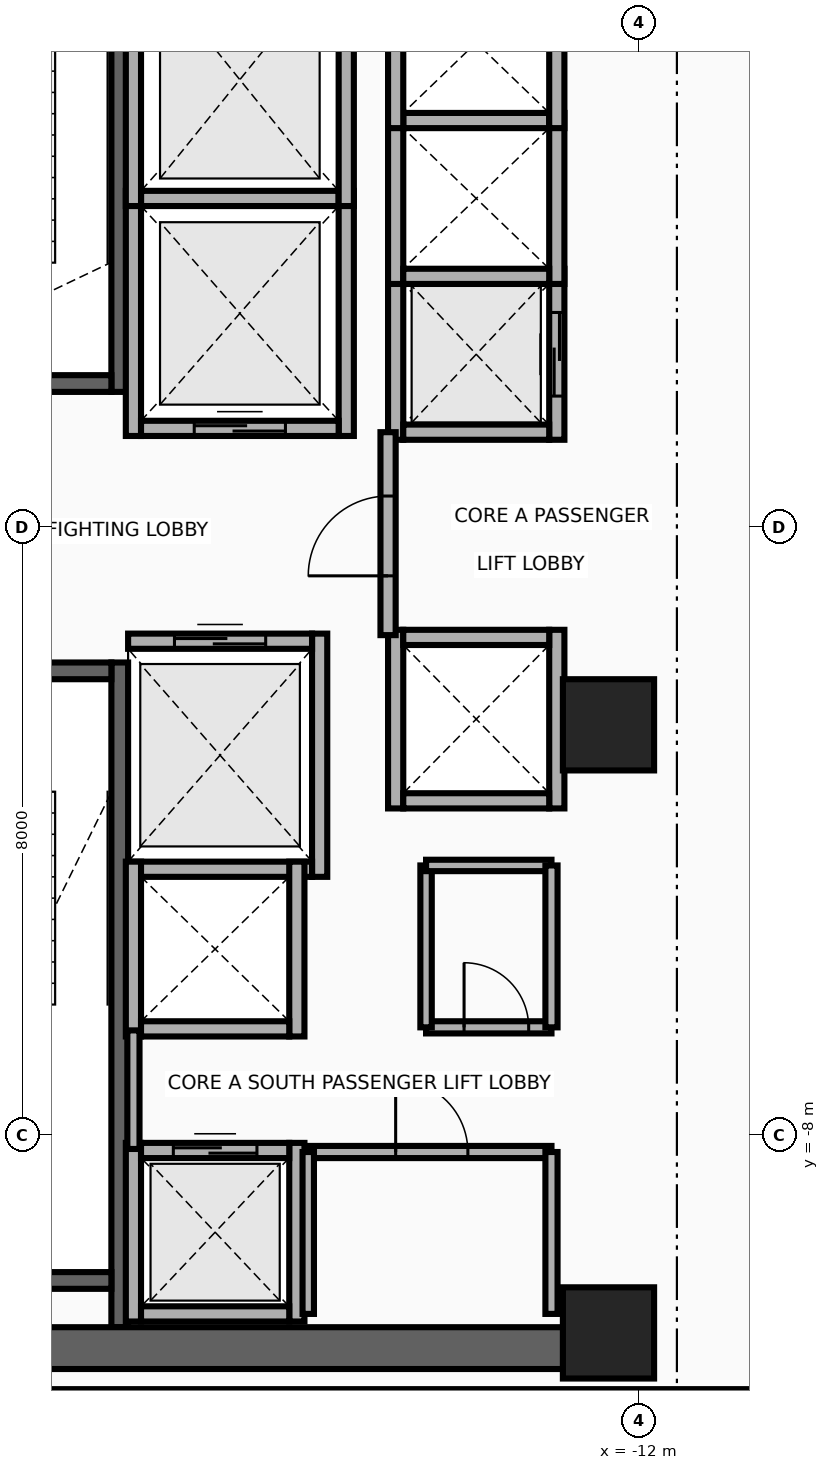
"""IFC4 building model, lengths in metres.
Left out: names, types, materials, properties, quantities, classifications, styles, units other than length and angle.
Written with IfcOpenShell. Run it as: python <this file> out.ifc"""

import sys

from ifc_helpers import new_model, si_unit, direction, frame, frame_2d, origin, origin_2d, place, context, subcontext, project, spatial, rectangle, extrude, source, transform, mapped, element, fill, save


model = new_model("IFC4")
c1 = context("Model", 3, precision=1e-05, world=origin(), true_north=direction((0.0, 1.0)))
c2 = subcontext(c1, "Body", "Model", "MODEL_VIEW")
j1 = project(units=[si_unit("LENGTHUNIT", "METRE"), si_unit("PLANEANGLEUNIT", "RADIAN")], contexts=[c1])
p1 = place(None, origin())
s1 = spatial("IfcSite", under=j1, at=p1, CompositionType="ELEMENT")
p2 = place(p1, origin())
s2 = spatial("IfcBuilding", under=s1, at=p2, CompositionType="ELEMENT")
p3 = place(p2, frame((0.0, 0.0, 164.9)))
s3 = spatial("IfcBuildingStorey", under=s2, at=p3, CompositionType="ELEMENT", Elevation=164.9)
p4 = place(p3, frame((-18.83, 1.78, 0.0), z_axis=(0.0, 0.0, 1.0), x_axis=(0.0, 1.0, 0.0)))
e1 = element("IfcWall", 1, at=p4, inside=s3, PredefinedType="SHEAR", context=c2, shape_type="SweptSolid", body=[
    extrude(rectangle(XDim=8.745, YDim=0.22, at=frame_2d((4.373, 0.0))), origin(), (0.0, 0.0, 1.0), 3.46),
])
p5 = place(p3, frame((-22.05, 1.89, 0.0), z_axis=(0.0, 0.0, 1.0), x_axis=(1.0, 0.0, 0.0)))
e2 = element("IfcWall", 2, at=p5, inside=s3, PredefinedType="SHEAR", context=c2, shape_type="SweptSolid", body=[
    extrude(rectangle(XDim=3.11, YDim=0.22, at=frame_2d((1.555, 0.0))), origin(), (0.0, 0.0, 1.0), 3.46),
])
p6 = place(p5, frame((1.0, 0.0, 0.0)))
e3 = element("IfcOpeningElement", 3, at=p6, cuts=e2, PredefinedType="OPENING", context=c2, shape_type="SweptSolid", body=[
    extrude(rectangle(XDim=1.1, YDim=2.15, at=frame_2d((0.55, 1.075))), frame((0.0, 0.125, 0.0), z_axis=(0.0, -1.0, 0.0), x_axis=(1.0, 0.0, 0.0)), (0.0, 0.0, 1.0), 0.25),
])
p7 = place(p3, frame((-18.83, -10.525, 0.0), z_axis=(0.0, 0.0, 1.0), x_axis=(0.0, 1.0, 0.0)))
e4 = element("IfcWall", 4, at=p7, inside=s3, PredefinedType="SHEAR", context=c2, shape_type="SweptSolid", body=[
    extrude(rectangle(XDim=8.745, YDim=0.22, at=frame_2d((4.373, 0.0))), origin(), (0.0, 0.0, 1.0), 3.46),
])
p8 = place(p3, frame((-22.05, -9.91, 0.0), z_axis=(0.0, 0.0, 1.0), x_axis=(1.0, 0.0, 0.0)))
e5 = element("IfcWall", 5, at=p8, inside=s3, PredefinedType="SHEAR", context=c2, shape_type="SweptSolid", body=[
    extrude(rectangle(XDim=3.11, YDim=0.22, at=frame_2d((1.555, 0.0))), origin(), (0.0, 0.0, 1.0), 3.46),
])
p9 = place(p3, frame((-22.05, -1.89, 0.0), z_axis=(0.0, 0.0, 1.0), x_axis=(1.0, 0.0, 0.0)))
e6 = element("IfcWall", 6, at=p9, inside=s3, PredefinedType="SHEAR", context=c2, shape_type="SweptSolid", body=[
    extrude(rectangle(XDim=3.11, YDim=0.22, at=frame_2d((1.555, 0.0))), origin(), (0.0, 0.0, 1.0), 3.46),
])
p10 = place(p9, frame((1.0, 0.0, 0.0)))
e7 = element("IfcOpeningElement", 7, at=p10, cuts=e6, PredefinedType="OPENING", context=c2, shape_type="SweptSolid", body=[
    extrude(rectangle(XDim=1.1, YDim=2.15, at=frame_2d((0.55, 1.075))), frame((0.0, 0.125, 0.0), z_axis=(0.0, -1.0, 0.0), x_axis=(1.0, 0.0, 0.0)), (0.0, 0.0, 1.0), 0.25),
])
p11 = place(p3, frame((-22.65, -10.8, 0.0), z_axis=(0.0, 0.0, 1.0), x_axis=(1.0, 0.0, 0.0)))
e8 = element("IfcWall", 8, at=p11, inside=s3, PredefinedType="SHEAR", context=c2, shape_type="SweptSolid", body=[
    extrude(rectangle(XDim=10.25, YDim=0.55, at=frame_2d((5.125, 0.0))), origin(), (0.0, 0.0, 1.0), 3.46),
])
m1 = source(origin(), c2, "Body", "SweptSolid", [
    extrude(rectangle(XDim=1.2, YDim=1.2, at=origin_2d()), origin(), (0.0, 0.0, 1.0), 3.7),
])
for number, where, z_axis, x_axis in (
    (9, (-12.4, -10.6, 0.0), (0.0, 0.0, 1.0), (1.0, 0.0, 0.0)),
    (10, (-12.4, -2.6, 0.0), (0.0, 0.0, 1.0), (1.0, 0.0, 0.0)),
):
    element("IfcColumn", number, at=place(p3, frame(where, z_axis=z_axis, x_axis=x_axis)), inside=s3, PredefinedType="COLUMN", context=c2, shape_type="MappedRepresentation", body=[
        mapped(m1, transform((0.0, 0.0, 0.0), x_axis=(1.0, 0.0, 0.0), y_axis=(0.0, 1.0, 0.0), z_axis=(0.0, 0.0, 1.0), scale=1.0)),
    ])
for number, where, z_axis, x_axis in (
    (11, (-18.65, 1.2, 0.0), (0.0, 0.0, 1.0), (0.0, 1.0, 0.0)),
    (12, (-15.85, 1.2, 0.0), (0.0, 0.0, 1.0), (0.0, 1.0, 0.0)),
):
    element("IfcWall", number, at=place(p3, frame(where, z_axis=z_axis, x_axis=x_axis)), inside=s3, PredefinedType="MOVABLE", context=c2, shape_type="SweptSolid", body=[
        extrude(rectangle(XDim=3.225, YDim=0.2, at=frame_2d((1.613, 0.0))), origin(), (0.0, 0.0, 1.0), 3.46),
    ])
p12 = place(p3, frame((-18.55, 1.3, 0.0), z_axis=(0.0, 0.0, 1.0), x_axis=(1.0, 0.0, 0.0)))
e13 = element("IfcWall", 13, at=p12, inside=s3, PredefinedType="MOVABLE", context=c2, shape_type="SweptSolid", body=[
    extrude(rectangle(XDim=2.6, YDim=0.2, at=frame_2d((1.3, 0.0))), origin(), (0.0, 0.0, 1.0), 3.46),
])
p13 = place(p12, frame((0.7, 0.0, 0.0)))
e14 = element("IfcOpeningElement", 14, at=p13, cuts=e13, PredefinedType="OPENING", context=c2, shape_type="SweptSolid", body=[
    extrude(rectangle(XDim=1.2, YDim=2.1, at=frame_2d((0.6, 1.05))), frame((0.0, 0.115, 0.0), z_axis=(0.0, -1.0, 0.0), x_axis=(1.0, 0.0, 0.0)), (0.0, 0.0, 1.0), 0.23),
])
p14 = place(p3, frame((-18.55, 4.325, 0.0), z_axis=(0.0, 0.0, 1.0), x_axis=(1.0, 0.0, 0.0)))
e15 = element("IfcWall", 15, at=p14, inside=s3, PredefinedType="MOVABLE", context=c2, shape_type="SweptSolid", body=[
    extrude(rectangle(XDim=2.6, YDim=0.2, at=frame_2d((1.3, 0.0))), origin(), (0.0, 0.0, 1.0), 3.46),
])
p15 = place(p3, frame((-16.2, -4.6, 0.0), z_axis=(0.0, 0.0, 1.0), x_axis=(0.0, 1.0, 0.0)))
e16 = element("IfcWall", 16, at=p15, inside=s3, PredefinedType="MOVABLE", context=c2, shape_type="SweptSolid", body=[
    extrude(rectangle(XDim=3.2, YDim=0.2, at=frame_2d((1.6, 0.0))), origin(), (0.0, 0.0, 1.0), 3.46),
])
p16 = place(p3, frame((-18.72, -4.5, 0.0), z_axis=(0.0, 0.0, 1.0), x_axis=(1.0, 0.0, 0.0)))
e17 = element("IfcWall", 17, at=p16, inside=s3, PredefinedType="MOVABLE", context=c2, shape_type="SweptSolid", body=[
    extrude(rectangle(XDim=2.42, YDim=0.2, at=frame_2d((1.21, 0.0))), origin(), (0.0, 0.0, 1.0), 3.46),
])
p17 = place(p3, frame((-18.72, -1.5, 0.0), z_axis=(0.0, 0.0, 1.0), x_axis=(1.0, 0.0, 0.0)))
e18 = element("IfcWall", 18, at=p17, inside=s3, PredefinedType="MOVABLE", context=c2, shape_type="SweptSolid", body=[
    extrude(rectangle(XDim=2.42, YDim=0.2, at=frame_2d((1.21, 0.0))), origin(), (0.0, 0.0, 1.0), 3.46),
])
p18 = place(p17, frame((0.61, 0.0, 0.0)))
e19 = element("IfcOpeningElement", 19, at=p18, cuts=e18, PredefinedType="OPENING", context=c2, shape_type="SweptSolid", body=[
    extrude(rectangle(XDim=1.2, YDim=2.1, at=frame_2d((0.6, 1.05))), frame((0.0, 0.115, 0.0), z_axis=(0.0, -1.0, 0.0), x_axis=(1.0, 0.0, 0.0)), (0.0, 0.0, 1.0), 0.23),
])
for number, where, z_axis, x_axis in (
    (20, (-18.65, 4.225, 0.0), (0.0, 0.0, 1.0), (0.0, 1.0, 0.0)),
    (21, (-15.85, 4.225, 0.0), (0.0, 0.0, 1.0), (0.0, 1.0, 0.0)),
):
    element("IfcWall", number, at=place(p3, frame(where, z_axis=z_axis, x_axis=x_axis)), inside=s3, PredefinedType="MOVABLE", context=c2, shape_type="SweptSolid", body=[
        extrude(rectangle(XDim=3.325, YDim=0.2, at=frame_2d((1.663, 0.0))), origin(), (0.0, 0.0, 1.0), 3.46),
    ])
for number, where, z_axis, x_axis in (
    (22, (-18.65, -10.45, 0.0), (0.0, 0.0, 1.0), (0.0, 1.0, 0.0)),
    (23, (-16.5, -10.45, 0.0), (0.0, 0.0, 1.0), (0.0, 1.0, 0.0)),
):
    element("IfcWall", number, at=place(p3, frame(where, z_axis=z_axis, x_axis=x_axis)), inside=s3, PredefinedType="MOVABLE", context=c2, shape_type="SweptSolid", body=[
        extrude(rectangle(XDim=2.35, YDim=0.2, at=frame_2d((1.175, 0.0))), origin(), (0.0, 0.0, 1.0), 2.666),
    ])
p19 = place(p3, frame((-18.55, -10.35, 0.0), z_axis=(0.0, 0.0, 1.0), x_axis=(1.0, 0.0, 0.0)))
e24 = element("IfcWall", 24, at=p19, inside=s3, PredefinedType="MOVABLE", context=c2, shape_type="SweptSolid", body=[
    extrude(rectangle(XDim=1.95, YDim=0.2, at=frame_2d((0.975, 0.0))), origin(), (0.0, 0.0, 1.0), 2.666),
])
p20 = place(p3, frame((-18.55, -8.2, 0.0), z_axis=(0.0, 0.0, 1.0), x_axis=(1.0, 0.0, 0.0)))
e25 = element("IfcWall", 25, at=p20, inside=s3, PredefinedType="MOVABLE", context=c2, shape_type="SweptSolid", body=[
    extrude(rectangle(XDim=1.95, YDim=0.2, at=frame_2d((0.975, 0.0))), origin(), (0.0, 0.0, 1.0), 3.46),
])
p21 = place(p20, frame((0.425, 0.0, 0.0)))
e26 = element("IfcOpeningElement", 26, at=p21, cuts=e25, PredefinedType="OPENING", context=c2, shape_type="SweptSolid", body=[
    extrude(rectangle(XDim=1.1, YDim=2.1, at=frame_2d((0.55, 1.05))), frame((0.0, 0.115, 0.0), z_axis=(0.0, -1.0, 0.0), x_axis=(1.0, 0.0, 0.0)), (0.0, 0.0, 1.0), 0.23),
])
p22 = place(p3, frame((-15.2, 1.15, 0.0), z_axis=(0.0, 0.0, 1.0), x_axis=(0.0, 1.0, 0.0)))
e27 = element("IfcWall", 27, at=p22, inside=s3, PredefinedType="MOVABLE", context=c2, shape_type="SweptSolid", body=[
    extrude(rectangle(XDim=2.25, YDim=0.2, at=frame_2d((1.125, 0.0))), origin(), (0.0, 0.0, 1.0), 3.46),
])
p23 = place(p3, frame((-13.08, 1.15, 0.0), z_axis=(0.0, 0.0, 1.0), x_axis=(0.0, 1.0, 0.0)))
e28 = element("IfcWall", 28, at=p23, inside=s3, PredefinedType="MOVABLE", context=c2, shape_type="SweptSolid", body=[
    extrude(rectangle(XDim=2.25, YDim=0.2, at=frame_2d((1.125, 0.0))), origin(), (0.0, 0.0, 1.0), 3.46),
])
p24 = place(p23, frame((0.575, 0.0, 0.0)))
e29 = element("IfcOpeningElement", 29, at=p24, cuts=e28, PredefinedType="OPENING", context=c2, shape_type="SweptSolid", body=[
    extrude(rectangle(XDim=1.1, YDim=2.1, at=frame_2d((0.55, 1.05))), frame((0.0, 0.115, 0.0), z_axis=(0.0, -1.0, 0.0), x_axis=(1.0, 0.0, 0.0)), (0.0, 0.0, 1.0), 0.23),
])
p25 = place(p3, frame((-15.1, 1.25, 0.0), z_axis=(0.0, 0.0, 1.0), x_axis=(1.0, 0.0, 0.0)))
e30 = element("IfcWall", 30, at=p25, inside=s3, PredefinedType="MOVABLE", context=c2, shape_type="SweptSolid", body=[
    extrude(rectangle(XDim=1.92, YDim=0.2, at=frame_2d((0.96, 0.0))), origin(), (0.0, 0.0, 1.0), 3.46),
])
for number, where, z_axis, x_axis in (
    (31, (-15.2, 3.2, 0.0), (0.0, 0.0, 1.0), (0.0, 1.0, 0.0)),
    (32, (-13.08, 3.2, 0.0), (0.0, 0.0, 1.0), (0.0, 1.0, 0.0)),
):
    element("IfcWall", number, at=place(p3, frame(where, z_axis=z_axis, x_axis=x_axis)), inside=s3, PredefinedType="MOVABLE", context=c2, shape_type="SweptSolid", body=[
        extrude(rectangle(XDim=2.25, YDim=0.2, at=frame_2d((1.125, 0.0))), origin(), (0.0, 0.0, 1.0), 3.46),
    ])
for number, where, z_axis, x_axis in (
    (33, (-15.1, 3.3, 0.0), (0.0, 0.0, 1.0), (1.0, 0.0, 0.0)),
    (34, (-15.1, 5.35, 0.0), (0.0, 0.0, 1.0), (1.0, 0.0, 0.0)),
):
    element("IfcWall", number, at=place(p3, frame(where, z_axis=z_axis, x_axis=x_axis)), inside=s3, PredefinedType="MOVABLE", context=c2, shape_type="SweptSolid", body=[
        extrude(rectangle(XDim=1.92, YDim=0.2, at=frame_2d((0.96, 0.0))), origin(), (0.0, 0.0, 1.0), 3.46),
    ])
for number, where, z_axis, x_axis in (
    (35, (-15.2, 5.25, 0.0), (0.0, 0.0, 1.0), (0.0, 1.0, 0.0)),
    (36, (-13.08, 5.25, 0.0), (0.0, 0.0, 1.0), (0.0, 1.0, 0.0)),
):
    element("IfcWall", number, at=place(p3, frame(where, z_axis=z_axis, x_axis=x_axis)), inside=s3, PredefinedType="MOVABLE", context=c2, shape_type="SweptSolid", body=[
        extrude(rectangle(XDim=2.25, YDim=0.2, at=frame_2d((1.125, 0.0))), origin(), (0.0, 0.0, 1.0), 3.46),
    ])
for number, where, z_axis, x_axis in (
    (37, (-18.65, -6.7, 0.0), (0.0, 0.0, 1.0), (0.0, 1.0, 0.0)),
    (38, (-16.5, -6.7, 0.0), (0.0, 0.0, 1.0), (0.0, 1.0, 0.0)),
):
    element("IfcWall", number, at=place(p3, frame(where, z_axis=z_axis, x_axis=x_axis)), inside=s3, PredefinedType="MOVABLE", context=c2, shape_type="SweptSolid", body=[
        extrude(rectangle(XDim=2.3, YDim=0.2, at=frame_2d((1.15, 0.0))), origin(), (0.0, 0.0, 1.0), 3.46),
    ])
p26 = place(p3, frame((-18.55, -6.6, 0.0), z_axis=(0.0, 0.0, 1.0), x_axis=(1.0, 0.0, 0.0)))
e39 = element("IfcWall", 39, at=p26, inside=s3, PredefinedType="MOVABLE", context=c2, shape_type="SweptSolid", body=[
    extrude(rectangle(XDim=1.95, YDim=0.2, at=frame_2d((0.975, 0.0))), origin(), (0.0, 0.0, 1.0), 3.46),
])
for number, where, z_axis, x_axis in (
    (40, (-15.2, -3.7, 0.0), (0.0, 0.0, 1.0), (0.0, 1.0, 0.0)),
    (41, (-13.08, -3.7, 0.0), (0.0, 0.0, 1.0), (0.0, 1.0, 0.0)),
):
    element("IfcWall", number, at=place(p3, frame(where, z_axis=z_axis, x_axis=x_axis)), inside=s3, PredefinedType="MOVABLE", context=c2, shape_type="SweptSolid", body=[
        extrude(rectangle(XDim=2.35, YDim=0.2, at=frame_2d((1.175, 0.0))), origin(), (0.0, 0.0, 1.0), 3.46),
    ])
for number, where, z_axis, x_axis in (
    (42, (-15.1, -3.6, 0.0), (0.0, 0.0, 1.0), (1.0, 0.0, 0.0)),
    (43, (-15.1, -1.45, 0.0), (0.0, 0.0, 1.0), (1.0, 0.0, 0.0)),
):
    element("IfcWall", number, at=place(p3, frame(where, z_axis=z_axis, x_axis=x_axis)), inside=s3, PredefinedType="MOVABLE", context=c2, shape_type="SweptSolid", body=[
        extrude(rectangle(XDim=1.92, YDim=0.2, at=frame_2d((0.96, 0.0))), origin(), (0.0, 0.0, 1.0), 3.46),
    ])
p27 = place(p3, frame((-15.3, -1.42, 0.0), z_axis=(0.0, 0.0, 1.0), x_axis=(0.0, 1.0, 0.0)))
e44 = element("IfcWall", 44, at=p27, inside=s3, PredefinedType="PARTITIONING", context=c2, shape_type="SweptSolid", body=[
    extrude(rectangle(XDim=2.67, YDim=0.2, at=frame_2d((1.335, 0.0))), origin(), (0.0, 0.0, 1.0), 3.46),
])
p28 = place(p27, frame((0.78, 0.0, 0.0)))
e45 = element("IfcOpeningElement", 45, at=p28, cuts=e44, PredefinedType="OPENING", context=c2, shape_type="SweptSolid", body=[
    extrude(rectangle(XDim=1.05, YDim=2.15, at=frame_2d((0.525, 1.075))), frame((0.0, 0.115, 0.0), z_axis=(0.0, -1.0, 0.0), x_axis=(1.0, 0.0, 0.0)), (0.0, 0.0, 1.0), 0.23),
])
p29 = place(p3, frame((-18.65, -8.18, 0.0), z_axis=(0.0, 0.0, 1.0), x_axis=(0.0, 1.0, 0.0)))
e46 = element("IfcWall", 46, at=p29, inside=s3, PredefinedType="PARTITIONING", context=c2, shape_type="SweptSolid", body=[
    extrude(rectangle(XDim=1.56, YDim=0.16, at=frame_2d((0.78, 0.0))), origin(), (0.0, 0.0, 1.0), 3.46),
])
p30 = place(p3, frame((-16.35, -8.22, 0.0), z_axis=(0.0, 0.0, 1.0), x_axis=(1.0, 0.0, 0.0)))
e47 = element("IfcWall", 47, at=p30, inside=s3, PredefinedType="PARTITIONING", context=c2, shape_type="SweptSolid", body=[
    extrude(rectangle(XDim=3.2, YDim=0.16, at=frame_2d((1.6, 0.0))), origin(), (0.0, 0.0, 1.0), 3.46),
])
p31 = place(p30, frame((1.15, 0.0, 0.0)))
e48 = element("IfcOpeningElement", 48, at=p31, cuts=e47, PredefinedType="OPENING", context=c2, shape_type="SweptSolid", body=[
    extrude(rectangle(XDim=0.95, YDim=2.15, at=frame_2d((0.475, 1.075))), frame((0.0, 0.095, 0.0), z_axis=(0.0, -1.0, 0.0), x_axis=(1.0, 0.0, 0.0)), (0.0, 0.0, 1.0), 0.19),
])
p32 = place(p3, frame((-16.35, -10.35, 0.0), z_axis=(0.0, 0.0, 1.0), x_axis=(0.0, 1.0, 0.0)))
e49 = element("IfcWall", 49, at=p32, inside=s3, PredefinedType="PARTITIONING", context=c2, shape_type="SweptSolid", body=[
    extrude(rectangle(XDim=2.13, YDim=0.15, at=frame_2d((1.065, 0.0))), origin(), (0.0, 0.0, 1.0), 3.46),
])
p33 = place(p3, frame((-13.15, -10.35, 0.0), z_axis=(0.0, 0.0, 1.0), x_axis=(0.0, 1.0, 0.0)))
e50 = element("IfcWall", 50, at=p33, inside=s3, PredefinedType="PARTITIONING", context=c2, shape_type="SweptSolid", body=[
    extrude(rectangle(XDim=2.13, YDim=0.16, at=frame_2d((1.065, 0.0))), origin(), (0.0, 0.0, 1.0), 3.46),
])
p34 = place(p3, frame((-14.8, -6.58, 0.0), z_axis=(0.0, 0.0, 1.0), x_axis=(1.0, 0.0, 0.0)))
e51 = element("IfcWall", 51, at=p34, inside=s3, PredefinedType="PARTITIONING", context=c2, shape_type="SweptSolid", body=[
    extrude(rectangle(XDim=1.65, YDim=0.16, at=frame_2d((0.825, 0.0))), origin(), (0.0, 0.0, 1.0), 3.46),
])
p35 = place(p34, frame((0.5, 0.0, 0.0)))
e52 = element("IfcOpeningElement", 52, at=p35, cuts=e51, PredefinedType="OPENING", context=c2, shape_type="SweptSolid", body=[
    extrude(rectangle(XDim=0.85, YDim=2.05, at=frame_2d((0.425, 1.025))), frame((0.0, 0.095, 0.0), z_axis=(0.0, -1.0, 0.0), x_axis=(1.0, 0.0, 0.0)), (0.0, 0.0, 1.0), 0.19),
])
p36 = place(p3, frame((-14.8, -6.58, 0.0), z_axis=(0.0, 0.0, 1.0), x_axis=(0.0, 1.0, 0.0)))
e53 = element("IfcWall", 53, at=p36, inside=s3, PredefinedType="PARTITIONING", context=c2, shape_type="SweptSolid", body=[
    extrude(rectangle(XDim=2.13, YDim=0.15, at=frame_2d((1.065, 0.0))), origin(), (0.0, 0.0, 1.0), 3.46),
])
p37 = place(p3, frame((-14.8, -4.45, 0.0), z_axis=(0.0, 0.0, 1.0), x_axis=(1.0, 0.0, 0.0)))
e54 = element("IfcWall", 54, at=p37, inside=s3, PredefinedType="PARTITIONING", context=c2, shape_type="SweptSolid", body=[
    extrude(rectangle(XDim=1.65, YDim=0.15, at=frame_2d((0.825, 0.0))), origin(), (0.0, 0.0, 1.0), 3.46),
])
p38 = place(p3, frame((-13.15, -6.58, 0.0), z_axis=(0.0, 0.0, 1.0), x_axis=(0.0, 1.0, 0.0)))
e55 = element("IfcWall", 55, at=p38, inside=s3, PredefinedType="PARTITIONING", context=c2, shape_type="SweptSolid", body=[
    extrude(rectangle(XDim=2.13, YDim=0.16, at=frame_2d((1.065, 0.0))), origin(), (0.0, 0.0, 1.0), 3.46),
])
p39 = place(p3, frame((-23.45, -11.42, 0.0), z_axis=(0.0, 0.0, 1.0), x_axis=(1.0, 0.0, 0.0)))
e56 = element("IfcWall", 56, at=p39, inside=s3, PredefinedType="PARTITIONING", context=c2, shape_type="SweptSolid", body=[
    extrude(rectangle(XDim=13.84, YDim=0.16, at=frame_2d((6.92, 0.0))), origin(), (0.0, 0.0, 1.0), 2.834),
])
p40 = place(p13, origin())
e57 = element("IfcDoor", 57, at=p40, inside=s3, OperationType="DOUBLE_DOOR_SLIDING", PredefinedType="DOOR", context=c2, shape_type="SweptSolid", body=[
    extrude(rectangle(XDim=1.2, YDim=2.1, at=frame_2d((0.6, 1.05))), frame((0.0, 0.025, 0.0), z_axis=(0.0, -1.0, 0.0), x_axis=(1.0, 0.0, 0.0)), (0.0, 0.0, 1.0), 0.05),
])
fill(e14, e57)
p41 = place(p18, origin())
e58 = element("IfcDoor", 58, at=p41, inside=s3, OperationType="DOUBLE_DOOR_SLIDING", PredefinedType="DOOR", context=c2, shape_type="SweptSolid", body=[
    extrude(rectangle(XDim=1.2, YDim=2.1, at=frame_2d((0.6, 1.05))), frame((0.0, 0.025, 0.0), z_axis=(0.0, -1.0, 0.0), x_axis=(1.0, 0.0, 0.0)), (0.0, 0.0, 1.0), 0.05),
])
fill(e19, e58)
p42 = place(p21, origin())
e59 = element("IfcDoor", 59, at=p42, inside=s3, OperationType="DOUBLE_DOOR_SLIDING", PredefinedType="DOOR", context=c2, shape_type="SweptSolid", body=[
    extrude(rectangle(XDim=1.1, YDim=2.1, at=frame_2d((0.55, 1.05))), frame((0.0, 0.025, 0.0), z_axis=(0.0, -1.0, 0.0), x_axis=(1.0, 0.0, 0.0)), (0.0, 0.0, 1.0), 0.05),
])
fill(e26, e59)
p43 = place(p24, origin())
e60 = element("IfcDoor", 60, at=p43, inside=s3, OperationType="DOUBLE_DOOR_SLIDING", PredefinedType="DOOR", context=c2, shape_type="SweptSolid", body=[
    extrude(rectangle(XDim=1.1, YDim=2.1, at=frame_2d((0.55, 1.05))), frame((0.0, 0.025, 0.0), z_axis=(0.0, -1.0, 0.0), x_axis=(1.0, 0.0, 0.0)), (0.0, 0.0, 1.0), 0.05),
])
fill(e29, e60)
p44 = place(p28, origin())
e61 = element("IfcDoor", 61, at=p44, inside=s3, OperationType="SINGLE_SWING_RIGHT", PredefinedType="DOOR", context=c2, shape_type="SweptSolid", body=[
    extrude(rectangle(XDim=1.05, YDim=2.15, at=frame_2d((0.525, 1.075))), frame((0.0, 0.025, 0.0), z_axis=(0.0, -1.0, 0.0), x_axis=(1.0, 0.0, 0.0)), (0.0, 0.0, 1.0), 0.05),
])
fill(e45, e61)
p45 = place(p31, origin())
e62 = element("IfcDoor", 62, at=p45, inside=s3, OperationType="SINGLE_SWING_RIGHT", PredefinedType="DOOR", context=c2, shape_type="SweptSolid", body=[
    extrude(rectangle(XDim=0.95, YDim=2.15, at=frame_2d((0.475, 1.075))), frame((0.0, 0.025, 0.0), z_axis=(0.0, -1.0, 0.0), x_axis=(1.0, 0.0, 0.0)), (0.0, 0.0, 1.0), 0.05),
])
fill(e48, e62)
p46 = place(p35, origin())
e63 = element("IfcDoor", 63, at=p46, inside=s3, OperationType="SINGLE_SWING_LEFT", PredefinedType="DOOR", context=c2, shape_type="SweptSolid", body=[
    extrude(rectangle(XDim=0.85, YDim=2.05, at=frame_2d((0.425, 1.025))), frame((0.0, 0.025, 0.0), z_axis=(0.0, -1.0, 0.0), x_axis=(1.0, 0.0, 0.0)), (0.0, 0.0, 1.0), 0.05),
])
fill(e52, e63)
save(model, sys.argv[1])
